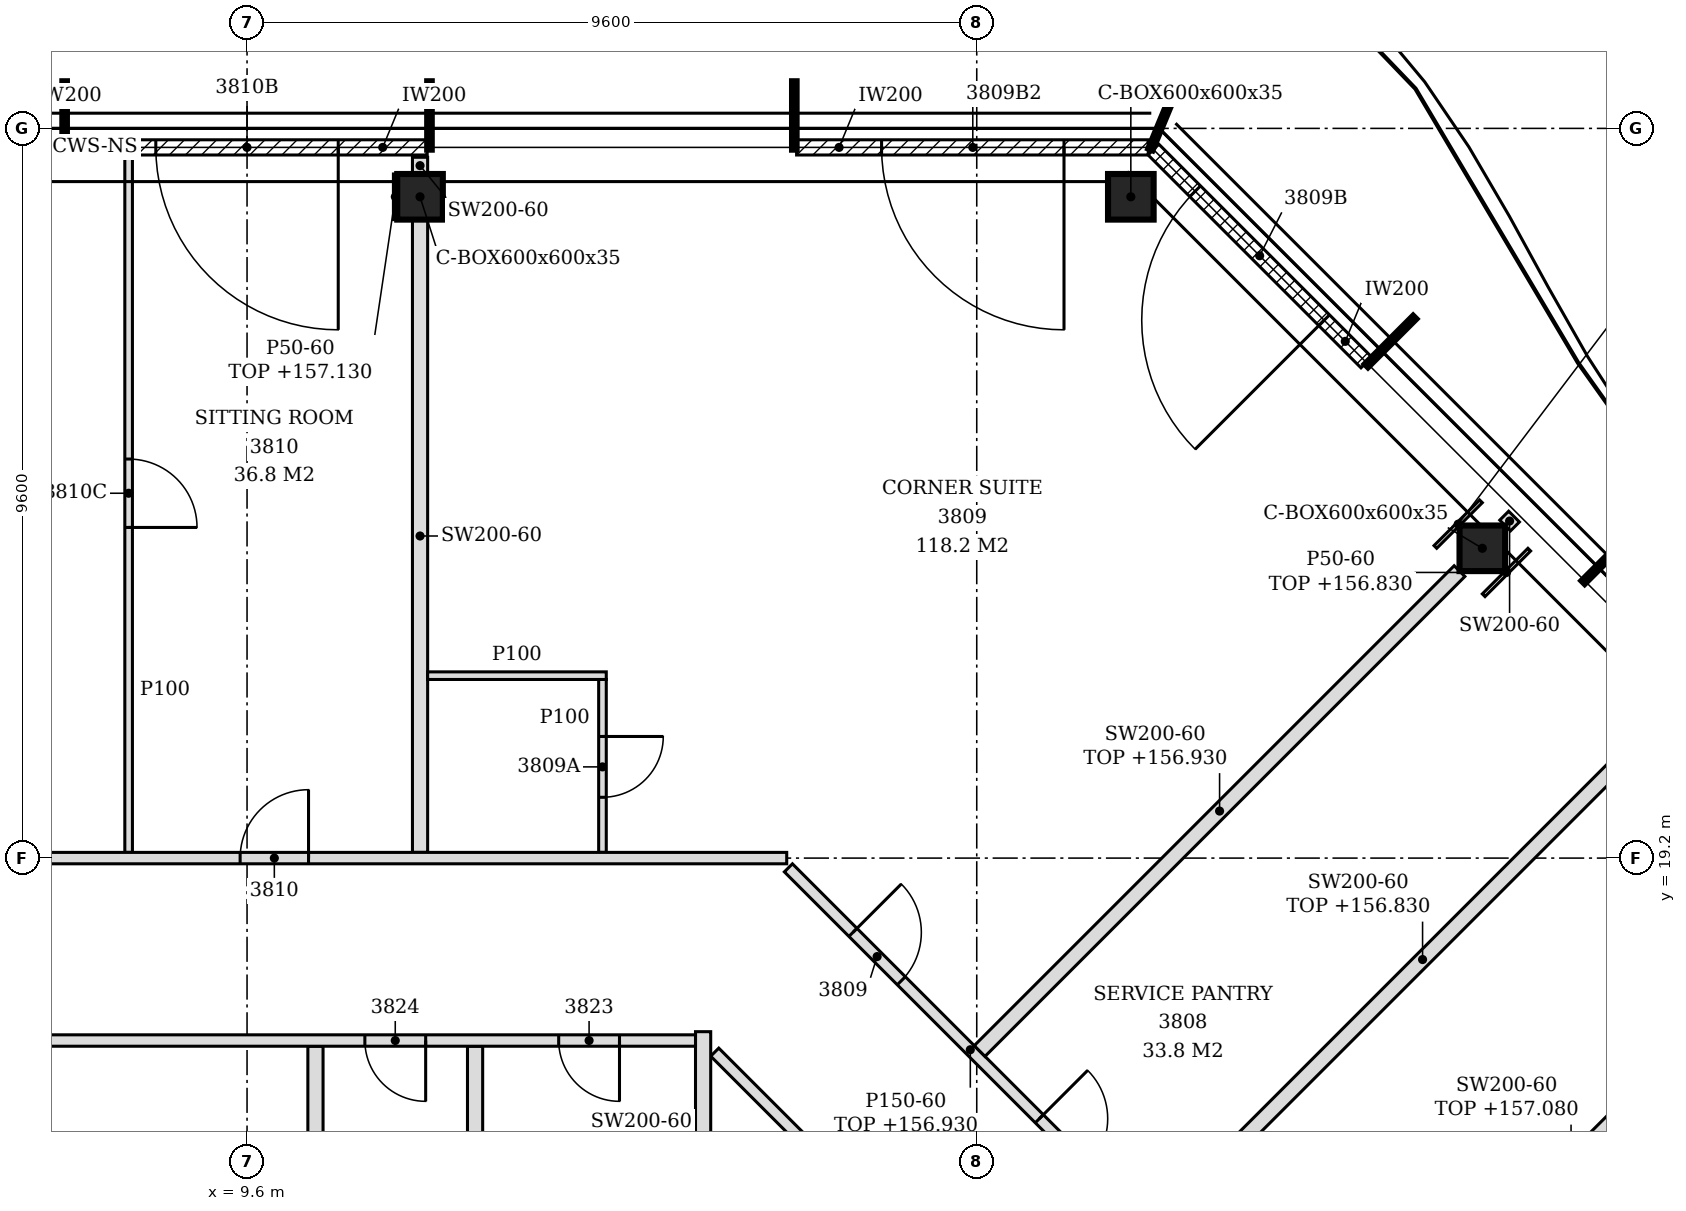
"""IFC4 building model, lengths in metres.
Left out: names, types, materials, properties, quantities, classifications, styles, units other than length and angle.
Written with IfcOpenShell. Run it as: python <this file> out.ifc"""

import sys

from ifc_helpers import new_model, si_unit, direction, frame, frame_2d, origin, origin_2d, place, context, subcontext, project, spatial, polyline, rectangle, hollow_rectangle, outline, extrude, element, fill, save


model = new_model("IFC4")
c1 = context("Model", 3, precision=1e-05, world=origin(), true_north=direction((0.0, 1.0)))
c2 = subcontext(c1, "Body", "Model", "MODEL_VIEW")
j1 = project(units=[si_unit("LENGTHUNIT", "METRE"), si_unit("PLANEANGLEUNIT", "RADIAN")], contexts=[c1])
p1 = place(None, origin())
s1 = spatial("IfcSite", under=j1, at=p1, CompositionType="ELEMENT")
p2 = place(p1, origin())
s2 = spatial("IfcBuilding", under=s1, at=p2, CompositionType="ELEMENT")
p3 = place(p2, frame((0.0, 0.0, 154.2)))
s3 = spatial("IfcBuildingStorey", under=s2, at=p3, CompositionType="ELEMENT", Elevation=154.2)
for number, where, z_axis, x_axis in (
    (1, (25.852, 23.276, -0.15), (0.0, 0.0, 1.0), (1.0, 0.0, 0.0)),
    (2, (21.227, 27.9, -0.15), (0.0, 0.0, 1.0), (1.0, 0.0, 0.0)),
    (3, (11.876, 27.9, -0.15), (0.0, 0.0, 1.0), (1.0, 0.0, 0.0)),
):
    element("IfcColumn", number, at=place(p3, frame(where, z_axis=z_axis, x_axis=x_axis)), inside=s3, PredefinedType="COLUMN", context=c2, shape_type="SweptSolid", body=[
        extrude(hollow_rectangle(XDim=0.6, YDim=0.6, WallThickness=0.035, at=origin_2d()), origin(), (0.0, 0.0, 1.0), 3.6),
    ])
p4 = place(p3, frame((24.326, 25.72, 0.0), z_axis=(0.0, 0.0, 1.0), x_axis=(-0.707106781187, 0.707106781187, 0.0)))
e4 = element("IfcWall", 4, at=p4, inside=s3, PredefinedType="NOTDEFINED", context=c2, shape_type="SweptSolid", body=[
    extrude(rectangle(XDim=3.962, YDim=0.2, at=frame_2d((1.981, 0.0))), origin(), (0.0, 0.0, 1.0), 3.45),
])
p5 = place(p4, frame((0.786, 0.0, 0.0)))
e5 = element("IfcOpeningElement", 5, at=p5, cuts=e4, PredefinedType="OPENING", context=c2, shape_type="SweptSolid", body=[
    extrude(rectangle(XDim=2.4, YDim=2.4, at=frame_2d((1.2, 1.2))), frame((0.0, 0.11, 0.0), z_axis=(0.0, -1.0, 0.0), x_axis=(1.0, 0.0, 0.0)), (0.0, 0.0, 1.0), 0.22),
])
p6 = place(p3, frame((21.457, 28.55, 0.0), z_axis=(0.0, 0.0, 1.0), x_axis=(-1.0, 0.0, 0.0)))
e6 = element("IfcWall", 6, at=p6, inside=s3, PredefinedType="NOTDEFINED", context=c2, shape_type="SweptSolid", body=[
    extrude(rectangle(XDim=4.626, YDim=0.2, at=frame_2d((2.313, 0.0))), origin(), (0.0, 0.0, 1.0), 3.45),
])
p7 = place(p6, frame((1.108, 0.0, 0.0)))
e7 = element("IfcOpeningElement", 7, at=p7, cuts=e6, PredefinedType="OPENING", context=c2, shape_type="SweptSolid", body=[
    extrude(rectangle(XDim=2.4, YDim=2.4, at=frame_2d((1.2, 1.2))), frame((0.0, 0.11, 0.0), z_axis=(0.0, -1.0, 0.0), x_axis=(1.0, 0.0, 0.0)), (0.0, 0.0, 1.0), 0.22),
])
p8 = place(p3, frame((11.97, 28.55, 0.0), z_axis=(0.0, 0.0, 1.0), x_axis=(-1.0, 0.0, 0.0)))
e8 = element("IfcWall", 8, at=p8, inside=s3, PredefinedType="NOTDEFINED", context=c2, shape_type="SweptSolid", body=[
    extrude(rectangle(XDim=4.74, YDim=0.2, at=frame_2d((2.37, 0.0))), origin(), (0.0, 0.0, 1.0), 3.45),
])
p9 = place(p8, frame((1.17, 0.0, 0.0)))
e9 = element("IfcOpeningElement", 9, at=p9, cuts=e8, PredefinedType="OPENING", context=c2, shape_type="SweptSolid", body=[
    extrude(rectangle(XDim=2.4, YDim=2.4, at=frame_2d((1.2, 1.2))), frame((0.0, 0.11, 0.0), z_axis=(0.0, -1.0, 0.0), x_axis=(1.0, 0.0, 0.0)), (0.0, 0.0, 1.0), 0.22),
])
p10 = place(p3, frame((7.17, 28.55, 0.0), z_axis=(0.0, 0.0, 1.0), x_axis=(-1.0, 0.0, 0.0)))
e10 = element("IfcWall", 10, at=p10, inside=s3, PredefinedType="NOTDEFINED", context=c2, shape_type="SweptSolid", body=[
    extrude(rectangle(XDim=4.74, YDim=0.2, at=frame_2d((2.37, 0.0))), origin(), (0.0, 0.0, 1.0), 3.45),
])
p11 = place(p10, frame((1.17, 0.0, 0.0)))
e11 = element("IfcOpeningElement", 11, at=p11, cuts=e10, PredefinedType="OPENING", context=c2, shape_type="SweptSolid", body=[
    extrude(rectangle(XDim=2.4, YDim=2.4, at=frame_2d((1.2, 1.2))), frame((0.0, 0.11, 0.0), z_axis=(0.0, -1.0, 0.0), x_axis=(1.0, 0.0, 0.0)), (0.0, 0.0, 1.0), 0.22),
])
p12 = place(p3, frame((26.272, 9.522, 0.0), z_axis=(0.0, 0.0, 1.0), x_axis=(-0.707097742657, 0.707115819601, 0.0)))
e12 = element("IfcWall", 12, at=p12, inside=s3, PredefinedType="PARTITIONING", context=c2, shape_type="SweptSolid", body=[
    extrude(rectangle(XDim=13.506, YDim=0.15, at=frame_2d((6.753, 0.0))), origin(), (0.0, 0.0, 1.0), 2.73),
])
p13 = place(p12, frame((1.398, 0.0, 0.0)))
e13 = element("IfcOpeningElement", 13, at=p13, cuts=e12, PredefinedType="OPENING", context=c2, shape_type="SweptSolid", body=[
    extrude(rectangle(XDim=0.9, YDim=2.1, at=frame_2d((0.45, 1.05))), frame((0.0, 0.085, 0.0), z_axis=(0.0, -1.0, 0.0), x_axis=(1.0, 0.0, 0.0)), (0.0, 0.0, 1.0), 0.17),
])
p14 = place(p12, frame((4.668, 0.0, 0.0)))
e14 = element("IfcOpeningElement", 14, at=p14, cuts=e12, PredefinedType="OPENING", context=c2, shape_type="SweptSolid", body=[
    extrude(rectangle(XDim=0.9, YDim=2.1, at=frame_2d((0.45, 1.05))), frame((0.0, 0.085, 0.0), z_axis=(0.0, -1.0, 0.0), x_axis=(1.0, 0.0, 0.0)), (0.0, 0.0, 1.0), 0.17),
])
p15 = place(p12, frame((7.938, 0.0, 0.0)))
e15 = element("IfcOpeningElement", 15, at=p15, cuts=e12, PredefinedType="OPENING", context=c2, shape_type="SweptSolid", body=[
    extrude(rectangle(XDim=0.9, YDim=2.1, at=frame_2d((0.45, 1.05))), frame((0.0, 0.085, 0.0), z_axis=(0.0, -1.0, 0.0), x_axis=(1.0, 0.0, 0.0)), (0.0, 0.0, 1.0), 0.17),
])
p16 = place(p12, frame((11.405, 0.0, 0.0)))
e16 = element("IfcOpeningElement", 16, at=p16, cuts=e12, PredefinedType="OPENING", context=c2, shape_type="SweptSolid", body=[
    extrude(rectangle(XDim=0.9, YDim=2.1, at=frame_2d((0.45, 1.05))), frame((0.0, 0.085, 0.0), z_axis=(0.0, -1.0, 0.0), x_axis=(1.0, 0.0, 0.0)), (0.0, 0.0, 1.0), 0.17),
])
p17 = place(p3, frame((26.174, 9.726, 0.0), z_axis=(0.0, 0.0, 1.0), x_axis=(0.707106781187, 0.707106781187, 0.0)))
e17 = element("IfcWall", 17, at=p17, inside=s3, PredefinedType="PARTITIONING", context=c2, shape_type="SweptSolid", body=[
    extrude(rectangle(XDim=9.873, YDim=0.1, at=frame_2d((4.937, 0.0))), origin(), (0.0, 0.0, 1.0), 2.88),
])
p18 = place(p17, frame((4.639, 0.0, 0.0)))
e18 = element("IfcOpeningElement", 18, at=p18, cuts=e17, PredefinedType="OPENING", context=c2, shape_type="SweptSolid", body=[
    extrude(rectangle(XDim=0.9, YDim=2.1, at=frame_2d((0.45, 1.05))), frame((0.0, 0.06, 0.0), z_axis=(0.0, -1.0, 0.0), x_axis=(1.0, 0.0, 0.0)), (0.0, 0.0, 1.0), 0.12),
])
p19 = place(p3, frame((23.862, 12.038, 0.0), z_axis=(0.0, 0.0, 1.0), x_axis=(0.707106781187, 0.707106781187, 0.0)))
e19 = element("IfcWall", 19, at=p19, inside=s3, PredefinedType="PARTITIONING", context=c2, shape_type="SweptSolid", body=[
    extrude(rectangle(XDim=8.929, YDim=0.2, at=frame_2d((4.464, 0.0))), origin(), (0.0, 0.0, 1.0), 2.88),
])
p20 = place(p3, frame((19.002, 13.398, 0.0), z_axis=(0.0, 0.0, 1.0), x_axis=(-0.707106781187, 0.707106781187, 0.0)))
e20 = element("IfcWall", 20, at=p20, inside=s3, PredefinedType="PARTITIONING", context=c2, shape_type="SweptSolid", body=[
    extrude(rectangle(XDim=4.595, YDim=0.15, at=frame_2d((2.297, 0.0))), origin(), (0.0, 0.0, 1.0), 3.45),
])
p21 = place(p3, frame((12.6, 13.6, 0.0), z_axis=(0.0, 0.0, 1.0), x_axis=(0.0, 1.0, 0.0)))
e21 = element("IfcWall", 21, at=p21, inside=s3, PredefinedType="PARTITIONING", context=c2, shape_type="SweptSolid", body=[
    extrude(rectangle(XDim=3.125, YDim=0.2, at=frame_2d((1.562, 0.0))), origin(), (0.0, 0.0, 1.0), 3.45),
])
p22 = place(p3, frame((15.6, 13.6, 0.0), z_axis=(0.0, 0.0, 1.0), x_axis=(0.0, 1.0, 0.0)))
e22 = element("IfcWall", 22, at=p22, inside=s3, PredefinedType="PARTITIONING", context=c2, shape_type="SweptSolid", body=[
    extrude(rectangle(XDim=3.316, YDim=0.2, at=frame_2d((1.658, 0.0))), origin(), (0.0, 0.0, 1.0), 3.45),
])
p23 = place(p3, frame((10.5, 13.9, 0.0), z_axis=(0.0, 0.0, 1.0), x_axis=(0.0, 1.0, 0.0)))
e23 = element("IfcWall", 23, at=p23, inside=s3, PredefinedType="PARTITIONING", context=c2, shape_type="SweptSolid", body=[
    extrude(rectangle(XDim=2.825, YDim=0.2, at=frame_2d((1.413, 0.0))), origin(), (0.0, 0.0, 1.0), 3.45),
])
p24 = place(p3, frame((21.55, 14.35, 0.0), z_axis=(0.0, 0.0, 1.0), x_axis=(0.707106781187, 0.707106781187, 0.0)))
e24 = element("IfcWall", 24, at=p24, inside=s3, PredefinedType="PARTITIONING", context=c2, shape_type="SweptSolid", body=[
    extrude(rectangle(XDim=9.943, YDim=0.2, at=frame_2d((4.972, 0.0))), origin(), (0.0, 0.0, 1.0), 2.63),
])
p25 = place(p3, frame((19.238, 16.662, 0.0), z_axis=(0.0, 0.0, 1.0), x_axis=(0.707106781187, 0.707106781187, 0.0)))
e25 = element("IfcWall", 25, at=p25, inside=s3, PredefinedType="PARTITIONING", context=c2, shape_type="SweptSolid", body=[
    extrude(rectangle(XDim=8.929, YDim=0.2, at=frame_2d((4.464, 0.0))), origin(), (0.0, 0.0, 1.0), 2.73),
])
p26 = place(p3, frame((-1.306, 16.8, 0.0), z_axis=(0.0, 0.0, 1.0), x_axis=(1.0, 0.0, 0.0)))
e26 = element("IfcWall", 26, at=p26, inside=s3, PredefinedType="PARTITIONING", context=c2, shape_type="SweptSolid", body=[
    extrude(outline(polyline([(0.0, 0.0), (16.806, 0.0), (16.806, 3.45), (8.656, 3.45), (8.654, 2.73), (8.356, 2.73), (8.354, 3.45), (0.0, 3.45), (0.0, 0.0)])), frame((0.0, 0.075, 0.0), z_axis=(0.0, -1.0, 0.0), x_axis=(1.0, 0.0, 0.0)), (0.0, 0.0, 1.0), 0.15),
])
p27 = place(p26, frame((15.006, 0.0, 0.0)))
e27 = element("IfcOpeningElement", 27, at=p27, cuts=e26, PredefinedType="OPENING", context=c2, shape_type="SweptSolid", body=[
    extrude(rectangle(XDim=0.8, YDim=2.1, at=frame_2d((0.4, 1.05))), frame((0.0, 0.085, 0.0), z_axis=(0.0, -1.0, 0.0), x_axis=(1.0, 0.0, 0.0)), (0.0, 0.0, 1.0), 0.17),
])
p28 = place(p26, frame((12.456, 0.0, 0.0)))
e28 = element("IfcOpeningElement", 28, at=p28, cuts=e26, PredefinedType="OPENING", context=c2, shape_type="SweptSolid", body=[
    extrude(rectangle(XDim=0.8, YDim=2.1, at=frame_2d((0.4, 1.05))), frame((0.0, 0.085, 0.0), z_axis=(0.0, -1.0, 0.0), x_axis=(1.0, 0.0, 0.0)), (0.0, 0.0, 1.0), 0.17),
])
p29 = place(p3, frame((-2.3, 19.2, 0.0), z_axis=(0.0, 0.0, 1.0), x_axis=(1.0, 0.0, 0.0)))
e29 = element("IfcWall", 29, at=p29, inside=s3, PredefinedType="PARTITIONING", context=c2, shape_type="SweptSolid", body=[
    extrude(outline(polyline([(0.0, 0.0), (19.0, 0.0), (19.0, 2.88), (9.65, 2.88), (9.648, 2.73), (9.35, 2.73), (9.348, 2.88), (0.0, 2.88), (0.0, 0.0)])), frame((0.0, 0.075, 0.0), z_axis=(0.0, -1.0, 0.0), x_axis=(1.0, 0.0, 0.0)), (0.0, 0.0, 1.0), 0.15),
])
p30 = place(p29, frame((11.809, 0.0, 0.0)))
e30 = element("IfcOpeningElement", 30, at=p30, cuts=e29, PredefinedType="OPENING", context=c2, shape_type="SweptSolid", body=[
    extrude(rectangle(XDim=0.9, YDim=2.1, at=frame_2d((0.45, 1.05))), frame((0.0, 0.085, 0.0), z_axis=(0.0, -1.0, 0.0), x_axis=(1.0, 0.0, 0.0)), (0.0, 0.0, 1.0), 0.17),
])
p31 = place(p3, frame((8.042, 19.275, 0.0), z_axis=(0.0, 0.0, 1.0), x_axis=(0.0, 1.0, 0.0)))
e31 = element("IfcWall", 31, at=p31, inside=s3, PredefinedType="PARTITIONING", context=c2, shape_type="SweptSolid", body=[
    extrude(outline(polyline([(0.0, 0.0), (9.145, 0.0), (9.145, 3.45), (8.775, 3.45), (8.773, 2.93), (8.475, 2.93), (8.473, 3.45), (4.83, 3.45), (4.828, 2.88), (4.62, 2.88), (4.618, 3.45), (0.03, 3.45), (0.028, 2.88), (0.0, 2.88), (0.0, 0.0)])), frame((0.0, 0.05, 0.0), z_axis=(0.0, -1.0, 0.0), x_axis=(1.0, 0.0, 0.0)), (0.0, 0.0, 1.0), 0.1),
])
p32 = place(p31, frame((4.275, 0.0, 0.0)))
e32 = element("IfcOpeningElement", 32, at=p32, cuts=e31, PredefinedType="OPENING", context=c2, shape_type="SweptSolid", body=[
    extrude(rectangle(XDim=0.9, YDim=2.1, at=frame_2d((0.45, 1.05))), frame((0.0, 0.06, 0.0), z_axis=(0.0, -1.0, 0.0), x_axis=(1.0, 0.0, 0.0)), (0.0, 0.0, 1.0), 0.12),
])
p33 = place(p3, frame((11.876, 19.275, 0.0), z_axis=(0.0, 0.0, 1.0), x_axis=(0.0, 1.0, 0.0)))
e33 = element("IfcWall", 33, at=p33, inside=s3, PredefinedType="PARTITIONING", context=c2, shape_type="SweptSolid", body=[
    extrude(outline(polyline([(0.0, 0.0), (8.325, 0.0), (8.325, 3.45), (4.83, 3.45), (4.828, 2.88), (4.62, 2.88), (4.618, 3.45), (0.03, 3.45), (0.028, 2.88), (0.0, 2.88), (0.0, 0.0)])), frame((0.0, 0.1, 0.0), z_axis=(0.0, -1.0, 0.0), x_axis=(1.0, 0.0, 0.0)), (0.0, 0.0, 1.0), 0.2),
])
p34 = place(p3, frame((14.276, 19.275, 0.0), z_axis=(0.0, 0.0, 1.0), x_axis=(0.0, 1.0, 0.0)))
e34 = element("IfcWall", 34, at=p34, inside=s3, PredefinedType="PARTITIONING", context=c2, shape_type="SweptSolid", body=[
    extrude(outline(polyline([(0.0, 0.0), (2.275, 0.0), (2.275, 3.45), (0.03, 3.45), (0.028, 2.88), (0.0, 2.88), (0.0, 0.0)])), frame((0.0, 0.05, 0.0), z_axis=(0.0, -1.0, 0.0), x_axis=(1.0, 0.0, 0.0)), (0.0, 0.0, 1.0), 0.1),
])
p35 = place(p34, frame((0.725, 0.0, 0.0)))
e35 = element("IfcOpeningElement", 35, at=p35, cuts=e34, PredefinedType="OPENING", context=c2, shape_type="SweptSolid", body=[
    extrude(rectangle(XDim=0.8, YDim=2.1, at=frame_2d((0.4, 1.05))), frame((0.0, 0.06, 0.0), z_axis=(0.0, -1.0, 0.0), x_axis=(1.0, 0.0, 0.0)), (0.0, 0.0, 1.0), 0.12),
])
p36 = place(p3, frame((11.976, 21.6, 0.0), z_axis=(0.0, 0.0, 1.0), x_axis=(1.0, 0.0, 0.0)))
e36 = element("IfcWall", 36, at=p36, inside=s3, PredefinedType="PARTITIONING", context=c2, shape_type="SweptSolid", body=[
    extrude(rectangle(XDim=2.35, YDim=0.1, at=frame_2d((1.175, 0.0))), origin(), (0.0, 0.0, 1.0), 3.45),
])
p37 = place(p3, frame((26.152, 23.576, 0.0), z_axis=(0.0, 0.0, 1.0), x_axis=(0.707106781187, 0.707106781187, 0.0)))
e37 = element("IfcWall", 37, at=p37, inside=s3, PredefinedType="PARTITIONING", context=c2, shape_type="SweptSolid", body=[
    extrude(rectangle(XDim=0.166, YDim=0.2, at=frame_2d((0.083, 0.0))), origin(), (0.0, 0.0, 1.0), 3.45),
])
p38 = place(p3, frame((11.876, 28.2, 0.0), z_axis=(0.0, 0.0, 1.0), x_axis=(0.0, 1.0, 0.0)))
e38 = element("IfcWall", 38, at=p38, inside=s3, PredefinedType="PARTITIONING", context=c2, shape_type="SweptSolid", body=[
    extrude(rectangle(XDim=0.22, YDim=0.2, at=frame_2d((0.11, 0.0))), origin(), (0.0, 0.0, 1.0), 3.45),
])
p39 = place(p3, frame((25.234, 23.293, 0.0), z_axis=(0.0, 0.0, 1.0), x_axis=(0.707106781187, 0.707106781187, 0.0)))
e39 = element("IfcWall", 39, at=p39, inside=s3, PredefinedType="PARTITIONING", context=c2, shape_type="SweptSolid", body=[
    extrude(rectangle(XDim=0.848, YDim=0.05, at=frame_2d((0.424, 0.0))), origin(), (0.0, 0.0, 1.0), 2.93),
])
p40 = place(p3, frame((25.869, 22.658, 0.0), z_axis=(0.0, 0.0, 1.0), x_axis=(0.707106781187, 0.707106781187, 0.0)))
e40 = element("IfcWall", 40, at=p40, inside=s3, PredefinedType="PARTITIONING", context=c2, shape_type="SweptSolid", body=[
    extrude(rectangle(XDim=0.849, YDim=0.05, at=frame_2d((0.424, 0.0))), origin(), (0.0, 0.0, 1.0), 2.63),
])
p41 = place(p3, frame((11.551, 27.6, 0.0), z_axis=(0.0, 0.0, 1.0), x_axis=(0.0, 1.0, 0.0)))
e41 = element("IfcWall", 41, at=p41, inside=s3, PredefinedType="PARTITIONING", context=c2, shape_type="SweptSolid", body=[
    extrude(rectangle(XDim=0.6, YDim=0.05, at=frame_2d((0.3, 0.0))), origin(), (0.0, 0.0, 1.0), 2.93),
])
p42 = place(p5, origin())
e42 = element("IfcDoor", 42, at=p42, inside=s3, OperationType="SINGLE_SWING_LEFT", PredefinedType="DOOR", context=c2, shape_type="SweptSolid", body=[
    extrude(rectangle(XDim=2.4, YDim=2.4, at=frame_2d((1.2, 1.2))), frame((0.0, 0.025, 0.0), z_axis=(0.0, -1.0, 0.0), x_axis=(1.0, 0.0, 0.0)), (0.0, 0.0, 1.0), 0.05),
])
fill(e5, e42)
p43 = place(p7, origin())
e43 = element("IfcDoor", 43, at=p43, inside=s3, OperationType="SINGLE_SWING_LEFT", PredefinedType="DOOR", context=c2, shape_type="SweptSolid", body=[
    extrude(rectangle(XDim=2.4, YDim=2.4, at=frame_2d((1.2, 1.2))), frame((0.0, 0.025, 0.0), z_axis=(0.0, -1.0, 0.0), x_axis=(1.0, 0.0, 0.0)), (0.0, 0.0, 1.0), 0.05),
])
fill(e7, e43)
p44 = place(p9, origin())
e44 = element("IfcDoor", 44, at=p44, inside=s3, OperationType="SINGLE_SWING_LEFT", PredefinedType="DOOR", context=c2, shape_type="SweptSolid", body=[
    extrude(rectangle(XDim=2.4, YDim=2.4, at=frame_2d((1.2, 1.2))), frame((0.0, 0.025, 0.0), z_axis=(0.0, -1.0, 0.0), x_axis=(1.0, 0.0, 0.0)), (0.0, 0.0, 1.0), 0.05),
])
fill(e9, e44)
p45 = place(p15, frame((0.9, 0.0, 0.0), z_axis=(0.0, 0.0, 1.0), x_axis=(-1.0, 0.0, 0.0)))
e45 = element("IfcDoor", 45, at=p45, inside=s3, OperationType="SINGLE_SWING_LEFT", PredefinedType="DOOR", context=c2, shape_type="SweptSolid", body=[
    extrude(rectangle(XDim=0.9, YDim=2.1, at=frame_2d((0.45, 1.05))), frame((0.0, 0.025, 0.0), z_axis=(0.0, -1.0, 0.0), x_axis=(1.0, 0.0, 0.0)), (0.0, 0.0, 1.0), 0.05),
])
fill(e15, e45)
p46 = place(p16, frame((0.9, 0.0, 0.0), z_axis=(0.0, 0.0, 1.0), x_axis=(-1.0, 0.0, 0.0)))
e46 = element("IfcDoor", 46, at=p46, inside=s3, OperationType="SINGLE_SWING_LEFT", PredefinedType="DOOR", context=c2, shape_type="SweptSolid", body=[
    extrude(rectangle(XDim=0.9, YDim=2.1, at=frame_2d((0.45, 1.05))), frame((0.0, 0.025, 0.0), z_axis=(0.0, -1.0, 0.0), x_axis=(1.0, 0.0, 0.0)), (0.0, 0.0, 1.0), 0.05),
])
fill(e16, e46)
p47 = place(p35, frame((0.8, 0.0, 0.0), z_axis=(0.0, 0.0, 1.0), x_axis=(-1.0, 0.0, 0.0)))
e47 = element("IfcDoor", 47, at=p47, inside=s3, OperationType="SINGLE_SWING_LEFT", PredefinedType="DOOR", context=c2, shape_type="SweptSolid", body=[
    extrude(rectangle(XDim=0.8, YDim=2.1, at=frame_2d((0.4, 1.05))), frame((0.0, 0.025, 0.0), z_axis=(0.0, -1.0, 0.0), x_axis=(1.0, 0.0, 0.0)), (0.0, 0.0, 1.0), 0.05),
])
fill(e35, e47)
p48 = place(p30, origin())
e48 = element("IfcDoor", 48, at=p48, inside=s3, OperationType="SINGLE_SWING_RIGHT", PredefinedType="DOOR", context=c2, shape_type="SweptSolid", body=[
    extrude(rectangle(XDim=0.9, YDim=2.1, at=frame_2d((0.45, 1.05))), frame((0.0, 0.025, 0.0), z_axis=(0.0, -1.0, 0.0), x_axis=(1.0, 0.0, 0.0)), (0.0, 0.0, 1.0), 0.05),
])
fill(e30, e48)
p49 = place(p32, frame((0.9, 0.0, 0.0), z_axis=(0.0, 0.0, 1.0), x_axis=(-1.0, 0.0, 0.0)))
e49 = element("IfcDoor", 49, at=p49, inside=s3, OperationType="SINGLE_SWING_RIGHT", PredefinedType="DOOR", context=c2, shape_type="SweptSolid", body=[
    extrude(rectangle(XDim=0.9, YDim=2.1, at=frame_2d((0.45, 1.05))), frame((0.0, 0.025, 0.0), z_axis=(0.0, -1.0, 0.0), x_axis=(1.0, 0.0, 0.0)), (0.0, 0.0, 1.0), 0.05),
])
fill(e32, e49)
p50 = place(p27, frame((0.8, 0.0, 0.0), z_axis=(0.0, 0.0, 1.0), x_axis=(-1.0, 0.0, 0.0)))
e50 = element("IfcDoor", 50, at=p50, inside=s3, OperationType="SINGLE_SWING_LEFT", PredefinedType="DOOR", context=c2, shape_type="SweptSolid", body=[
    extrude(rectangle(XDim=0.8, YDim=2.1, at=frame_2d((0.4, 1.05))), frame((0.0, 0.025, 0.0), z_axis=(0.0, -1.0, 0.0), x_axis=(1.0, 0.0, 0.0)), (0.0, 0.0, 1.0), 0.05),
])
fill(e27, e50)
p51 = place(p28, frame((0.8, 0.0, 0.0), z_axis=(0.0, 0.0, 1.0), x_axis=(-1.0, 0.0, 0.0)))
e51 = element("IfcDoor", 51, at=p51, inside=s3, OperationType="SINGLE_SWING_LEFT", PredefinedType="DOOR", context=c2, shape_type="SweptSolid", body=[
    extrude(rectangle(XDim=0.8, YDim=2.1, at=frame_2d((0.4, 1.05))), frame((0.0, 0.025, 0.0), z_axis=(0.0, -1.0, 0.0), x_axis=(1.0, 0.0, 0.0)), (0.0, 0.0, 1.0), 0.05),
])
fill(e28, e51)
save(model, sys.argv[1])
